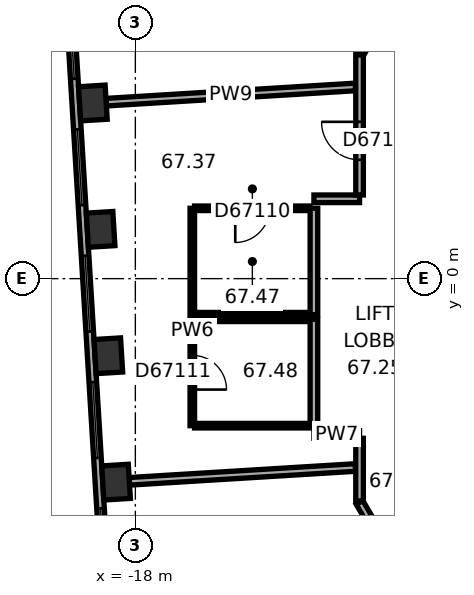
"""IFC4 building model, lengths in metres.
Left out: names, types, materials, properties, quantities, classifications, styles, units other than length and angle.
Written with IfcOpenShell. Run it as: python <this file> out.ifc"""

import sys

from ifc_helpers import new_model, si_unit, direction, frame, frame_2d, origin, origin_2d, place, context, subcontext, project, spatial, rectangle, extrude, element, fill, save


model = new_model("IFC4")
c1 = context("Model", 3, precision=1e-05, world=origin(), true_north=direction((0.0, 1.0)))
c2 = subcontext(c1, "Body", "Model", "MODEL_VIEW")
j1 = project(units=[si_unit("LENGTHUNIT", "METRE"), si_unit("PLANEANGLEUNIT", "RADIAN")], contexts=[c1])
p1 = place(None, origin())
s1 = spatial("IfcSite", under=j1, at=p1, CompositionType="ELEMENT")
p2 = place(p1, origin())
s2 = spatial("IfcBuilding", under=s1, at=p2, CompositionType="ELEMENT")
p3 = place(p2, frame((0.0, 0.0, 270.9)))
s3 = spatial("IfcBuildingStorey", under=s2, at=p3, CompositionType="ELEMENT", Elevation=270.9)
for number, where, z_axis, x_axis in (
    (1, (-19.118, 4.621, 0.0), (0.0, 0.0, 1.0), (0.061, -0.998, 0.0)),
    (2, (-18.914, 1.296, 0.0), (0.0, 0.0, 1.0), (0.061, -0.998, 0.0)),
    (3, (-18.711, -2.03, 0.0), (0.0, 0.0, 1.0), (0.061, -0.998, 0.0)),
    (4, (-18.508, -5.355, 0.0), (0.0, 0.0, 1.0), (0.061, -0.998, 0.0)),
):
    element("IfcColumn", number, at=place(p3, frame(where, z_axis=z_axis, x_axis=x_axis)), inside=s3, PredefinedType="COLUMN", context=c2, shape_type="SweptSolid", body=[
        extrude(rectangle(XDim=0.9, YDim=0.7, at=origin_2d()), origin(), (0.0, 0.0, 1.0), 3.7),
    ])
p4 = place(p3, frame((-19.803, 8.454, 0.0), z_axis=(0.0, 0.0, 1.0), x_axis=(0.061036717565, -0.998135521414, 0.0)))
e5 = element("IfcWall", 5, at=p4, inside=s3, PredefinedType="STANDARD", context=c2, shape_type="SweptSolid", body=[
    extrude(rectangle(XDim=17.731, YDim=0.2, at=frame_2d((8.866, 0.0))), origin(), (0.0, 0.0, 1.0), 3.7),
])
p5 = place(p4, frame((1.202, 0.0, 0.9)))
e6 = element("IfcOpeningElement", 6, at=p5, cuts=e5, PredefinedType="OPENING", context=c2, shape_type="SweptSolid", body=[
    extrude(rectangle(XDim=2.0, YDim=2.0, at=frame_2d((1.0, 1.0))), frame((0.0, 0.11, 0.0), z_axis=(0.0, -1.0, 0.0), x_axis=(1.0, 0.0, 0.0)), (0.0, 0.0, 1.0), 0.22),
])
p6 = place(p4, frame((4.533, 0.0, 0.9)))
e7 = element("IfcOpeningElement", 7, at=p6, cuts=e5, PredefinedType="OPENING", context=c2, shape_type="SweptSolid", body=[
    extrude(rectangle(XDim=2.0, YDim=2.0, at=frame_2d((1.0, 1.0))), frame((0.0, 0.11, 0.0), z_axis=(0.0, -1.0, 0.0), x_axis=(1.0, 0.0, 0.0)), (0.0, 0.0, 1.0), 0.22),
])
p7 = place(p4, frame((7.865, 0.0, 0.9)))
e8 = element("IfcOpeningElement", 8, at=p7, cuts=e5, PredefinedType="OPENING", context=c2, shape_type="SweptSolid", body=[
    extrude(rectangle(XDim=2.0, YDim=2.0, at=frame_2d((1.0, 1.0))), frame((0.0, 0.11, 0.0), z_axis=(0.0, -1.0, 0.0), x_axis=(1.0, 0.0, 0.0)), (0.0, 0.0, 1.0), 0.22),
])
p8 = place(p4, frame((11.197, 0.0, 0.9)))
e9 = element("IfcOpeningElement", 9, at=p8, cuts=e5, PredefinedType="OPENING", context=c2, shape_type="SweptSolid", body=[
    extrude(rectangle(XDim=2.0, YDim=2.0, at=frame_2d((1.0, 1.0))), frame((0.0, 0.11, 0.0), z_axis=(0.0, -1.0, 0.0), x_axis=(1.0, 0.0, 0.0)), (0.0, 0.0, 1.0), 0.22),
])
p9 = place(p4, frame((14.528, 0.0, 0.9)))
e10 = element("IfcOpeningElement", 10, at=p9, cuts=e5, PredefinedType="OPENING", context=c2, shape_type="SweptSolid", body=[
    extrude(rectangle(XDim=2.0, YDim=2.0, at=frame_2d((1.0, 1.0))), frame((0.0, 0.11, 0.0), z_axis=(0.0, -1.0, 0.0), x_axis=(1.0, 0.0, 0.0)), (0.0, 0.0, 1.0), 0.22),
])
p10 = place(p3, frame((-18.768, 4.643, 0.0), z_axis=(0.0, 0.0, 1.0), x_axis=(0.99813496285, 0.0610458511, 0.0)))
e11 = element("IfcWall", 11, at=p10, inside=s3, PredefinedType="PARTITIONING", context=c2, shape_type="SweptSolid", body=[
    extrude(rectangle(XDim=6.571, YDim=0.2, at=frame_2d((3.285, 0.0))), origin(), (0.0, 0.0, 1.0), 3.42),
])
p11 = place(p3, frame((-18.158, -5.333, 0.0), z_axis=(0.0, 0.0, 1.0), x_axis=(0.998135365626, 0.061039265125, 0.0)))
e12 = element("IfcWall", 12, at=p11, inside=s3, PredefinedType="PARTITIONING", context=c2, shape_type="SweptSolid", body=[
    extrude(rectangle(XDim=5.96, YDim=0.2, at=frame_2d((2.98, 0.0))), origin(), (0.0, 0.0, 1.0), 2.87),
])
p12 = place(p3, frame((-16.501, -3.869, 0.0), z_axis=(0.0, 0.0, 1.0), x_axis=(0.0, 1.0, 0.0)))
e13 = element("IfcWall", 13, at=p12, inside=s3, PredefinedType="PARTITIONING", context=c2, shape_type="SweptSolid", body=[
    extrude(rectangle(XDim=2.8, YDim=0.12, at=frame_2d((1.4, 0.0))), origin(), (0.0, 0.0, 1.0), 3.42),
])
p13 = place(p12, frame((0.95, 0.0, 0.0)))
e14 = element("IfcOpeningElement", 14, at=p13, cuts=e13, PredefinedType="OPENING", context=c2, shape_type="SweptSolid", body=[
    extrude(rectangle(XDim=0.9, YDim=2.1, at=frame_2d((0.45, 1.05))), frame((0.0, 0.07, 0.0), z_axis=(0.0, -1.0, 0.0), x_axis=(1.0, 0.0, 0.0)), (0.0, 0.0, 1.0), 0.14),
])
p14 = place(p3, frame((-16.501, -0.949, 0.0), z_axis=(0.0, 0.0, 1.0), x_axis=(0.0, 1.0, 0.0)))
e15 = element("IfcWall", 15, at=p14, inside=s3, PredefinedType="PARTITIONING", context=c2, shape_type="SweptSolid", body=[
    extrude(rectangle(XDim=2.8, YDim=0.12, at=frame_2d((1.4, 0.0))), origin(), (0.0, 0.0, 1.0), 3.42),
])
p15 = place(p3, frame((-16.441, -1.069, 0.0), z_axis=(0.0, 0.0, 1.0), x_axis=(1.0, 0.0, 0.0)))
e16 = element("IfcWall", 16, at=p15, inside=s3, PredefinedType="PARTITIONING", context=c2, shape_type="SweptSolid", body=[
    extrude(rectangle(XDim=3.04, YDim=0.12, at=frame_2d((1.52, 0.0))), origin(), (0.0, 0.0, 1.0), 3.42),
])
p16 = place(p3, frame((-16.441, 1.851, 0.0), z_axis=(0.0, 0.0, 1.0), x_axis=(1.0, 0.0, 0.0)))
e17 = element("IfcWall", 17, at=p16, inside=s3, PredefinedType="PARTITIONING", context=c2, shape_type="SweptSolid", body=[
    extrude(rectangle(XDim=3.04, YDim=0.12, at=frame_2d((1.52, 0.0))), origin(), (0.0, 0.0, 1.0), 3.42),
])
p17 = place(p16, frame((1.07, 0.0, 0.0)))
e18 = element("IfcOpeningElement", 18, at=p17, cuts=e17, PredefinedType="OPENING", context=c2, shape_type="SweptSolid", body=[
    extrude(rectangle(XDim=0.9, YDim=2.1, at=frame_2d((0.45, 1.05))), frame((0.0, 0.07, 0.0), z_axis=(0.0, -1.0, 0.0), x_axis=(1.0, 0.0, 0.0)), (0.0, 0.0, 1.0), 0.14),
])
for number, where, z_axis, x_axis in (
    (19, (-13.401, -3.869, 0.0), (0.0, 0.0, 1.0), (-1.0, 0.0, 0.0)),
    (20, (-13.401, -0.949, 0.0), (0.0, 0.0, 1.0), (-1.0, 0.0, 0.0)),
):
    element("IfcWall", number, at=place(p3, frame(where, z_axis=z_axis, x_axis=x_axis)), inside=s3, PredefinedType="PARTITIONING", context=c2, shape_type="SweptSolid", body=[
        extrude(rectangle(XDim=3.04, YDim=0.12, at=frame_2d((1.52, 0.0))), origin(), (0.0, 0.0, 1.0), 3.42),
    ])
p18 = place(p3, frame((-13.301, -4.101, 0.0), z_axis=(0.0, 0.0, 1.0), x_axis=(1.0, 0.0, 0.0)))
e21 = element("IfcWall", 21, at=p18, inside=s3, PredefinedType="PARTITIONING", context=c2, shape_type="SweptSolid", body=[
    extrude(rectangle(XDim=1.201, YDim=0.2, at=frame_2d((0.601, 0.0))), origin(), (0.0, 0.0, 1.0), 3.42),
])
p19 = place(p3, frame((-13.301, -1.069, 0.0), z_axis=(0.0, 0.0, 1.0), x_axis=(0.0, -1.0, 0.0)))
e22 = element("IfcWall", 22, at=p19, inside=s3, PredefinedType="PARTITIONING", context=c2, shape_type="SweptSolid", body=[
    extrude(rectangle(XDim=2.8, YDim=0.2, at=frame_2d((1.4, 0.0))), origin(), (0.0, 0.0, 1.0), 3.42),
])
p20 = place(p3, frame((-13.301, 1.851, 0.0), z_axis=(0.0, 0.0, 1.0), x_axis=(0.0, -1.0, 0.0)))
e23 = element("IfcWall", 23, at=p20, inside=s3, PredefinedType="PARTITIONING", context=c2, shape_type="SweptSolid", body=[
    extrude(rectangle(XDim=2.8, YDim=0.2, at=frame_2d((1.4, 0.0))), origin(), (0.0, 0.0, 1.0), 3.42),
])
p21 = place(p3, frame((-12.1, -5.889, 0.0), z_axis=(0.0, 0.0, 1.0), x_axis=(0.500063520245, -0.865988727248, 0.0)))
e24 = element("IfcWall", 24, at=p21, inside=s3, PredefinedType="PARTITIONING", context=c2, shape_type="SweptSolid", body=[
    extrude(rectangle(XDim=1.9, YDim=0.2, at=frame_2d((0.95, 0.0))), origin(), (0.0, 0.0, 1.0), 3.42),
])
p22 = place(p3, frame((-12.1, -4.201, 0.0), z_axis=(0.0, 0.0, 1.0), x_axis=(0.0, -1.0, 0.0)))
e25 = element("IfcWall", 25, at=p22, inside=s3, PredefinedType="PARTITIONING", context=c2, shape_type="SweptSolid", body=[
    extrude(rectangle(XDim=1.648, YDim=0.2, at=frame_2d((0.824, 0.0))), origin(), (0.0, 0.0, 1.0), 3.42),
])
p23 = place(p3, frame((-12.1, 2.101, 0.0), z_axis=(0.0, 0.0, 1.0), x_axis=(-1.0, 0.0, 0.0)))
e26 = element("IfcWall", 26, at=p23, inside=s3, PredefinedType="PARTITIONING", context=c2, shape_type="SweptSolid", body=[
    extrude(rectangle(XDim=1.201, YDim=0.2, at=frame_2d((0.601, 0.0))), origin(), (0.0, 0.0, 1.0), 3.42),
])
p24 = place(p3, frame((-12.1, 5.889, 0.0), z_axis=(0.0, 0.0, 1.0), x_axis=(0.0, -1.0, 0.0)))
e27 = element("IfcWall", 27, at=p24, inside=s3, PredefinedType="PARTITIONING", context=c2, shape_type="SweptSolid", body=[
    extrude(rectangle(XDim=3.688, YDim=0.2, at=frame_2d((1.844, 0.0))), origin(), (0.0, 0.0, 1.0), 3.42),
])
p25 = place(p24, frame((1.763, 0.0, 0.0)))
e28 = element("IfcOpeningElement", 28, at=p25, cuts=e27, PredefinedType="OPENING", context=c2, shape_type="SweptSolid", body=[
    extrude(rectangle(XDim=1.0, YDim=2.1, at=frame_2d((0.5, 1.05))), frame((0.0, 0.11, 0.0), z_axis=(0.0, -1.0, 0.0), x_axis=(1.0, 0.0, 0.0)), (0.0, 0.0, 1.0), 0.22),
])
p26 = place(p3, frame((-11.15, 7.534, 0.0), z_axis=(0.0, 0.0, 1.0), x_axis=(-0.500063286585, -0.865988862174, 0.0)))
e29 = element("IfcWall", 29, at=p26, inside=s3, PredefinedType="PARTITIONING", context=c2, shape_type="SweptSolid", body=[
    extrude(rectangle(XDim=1.86, YDim=0.2, at=frame_2d((0.93, 0.0))), origin(), (0.0, 0.0, 1.0), 3.42),
])
p27 = place(p5, origin())
e30 = element("IfcWindow", 30, at=p27, inside=s3, PartitioningType="SINGLE_PANEL", PredefinedType="WINDOW", context=c2, shape_type="SweptSolid", body=[
    extrude(rectangle(XDim=2.0, YDim=2.0, at=frame_2d((1.0, 1.0))), frame((0.0, 0.03, 0.0), z_axis=(0.0, -1.0, 0.0), x_axis=(1.0, 0.0, 0.0)), (0.0, 0.0, 1.0), 0.06),
])
fill(e6, e30)
p28 = place(p6, origin())
e31 = element("IfcWindow", 31, at=p28, inside=s3, PartitioningType="SINGLE_PANEL", PredefinedType="WINDOW", context=c2, shape_type="SweptSolid", body=[
    extrude(rectangle(XDim=2.0, YDim=2.0, at=frame_2d((1.0, 1.0))), frame((0.0, 0.03, 0.0), z_axis=(0.0, -1.0, 0.0), x_axis=(1.0, 0.0, 0.0)), (0.0, 0.0, 1.0), 0.06),
])
fill(e7, e31)
p29 = place(p7, origin())
e32 = element("IfcWindow", 32, at=p29, inside=s3, PartitioningType="SINGLE_PANEL", PredefinedType="WINDOW", context=c2, shape_type="SweptSolid", body=[
    extrude(rectangle(XDim=2.0, YDim=2.0, at=frame_2d((1.0, 1.0))), frame((0.0, 0.03, 0.0), z_axis=(0.0, -1.0, 0.0), x_axis=(1.0, 0.0, 0.0)), (0.0, 0.0, 1.0), 0.06),
])
fill(e8, e32)
p30 = place(p8, origin())
e33 = element("IfcWindow", 33, at=p30, inside=s3, PartitioningType="SINGLE_PANEL", PredefinedType="WINDOW", context=c2, shape_type="SweptSolid", body=[
    extrude(rectangle(XDim=2.0, YDim=2.0, at=frame_2d((1.0, 1.0))), frame((0.0, 0.03, 0.0), z_axis=(0.0, -1.0, 0.0), x_axis=(1.0, 0.0, 0.0)), (0.0, 0.0, 1.0), 0.06),
])
fill(e9, e33)
p31 = place(p9, origin())
e34 = element("IfcWindow", 34, at=p31, inside=s3, PartitioningType="SINGLE_PANEL", PredefinedType="WINDOW", context=c2, shape_type="SweptSolid", body=[
    extrude(rectangle(XDim=2.0, YDim=2.0, at=frame_2d((1.0, 1.0))), frame((0.0, 0.03, 0.0), z_axis=(0.0, -1.0, 0.0), x_axis=(1.0, 0.0, 0.0)), (0.0, 0.0, 1.0), 0.06),
])
fill(e10, e34)
p32 = place(p25, origin())
e35 = element("IfcDoor", 35, at=p32, inside=s3, OperationType="SINGLE_SWING_LEFT", PredefinedType="DOOR", context=c2, shape_type="SweptSolid", body=[
    extrude(rectangle(XDim=1.0, YDim=2.1, at=frame_2d((0.5, 1.05))), frame((0.0, 0.025, 0.0), z_axis=(0.0, -1.0, 0.0), x_axis=(1.0, 0.0, 0.0)), (0.0, 0.0, 1.0), 0.05),
])
fill(e28, e35)
p33 = place(p17, origin())
e36 = element("IfcDoor", 36, at=p33, inside=s3, OperationType="SINGLE_SWING_LEFT", PredefinedType="DOOR", context=c2, shape_type="SweptSolid", body=[
    extrude(rectangle(XDim=0.9, YDim=2.1, at=frame_2d((0.45, 1.05))), frame((0.0, 0.025, 0.0), z_axis=(0.0, -1.0, 0.0), x_axis=(1.0, 0.0, 0.0)), (0.0, 0.0, 1.0), 0.05),
])
fill(e18, e36)
p34 = place(p13, origin())
e37 = element("IfcDoor", 37, at=p34, inside=s3, OperationType="SINGLE_SWING_LEFT", PredefinedType="DOOR", context=c2, shape_type="SweptSolid", body=[
    extrude(rectangle(XDim=0.9, YDim=2.1, at=frame_2d((0.45, 1.05))), frame((0.0, 0.025, 0.0), z_axis=(0.0, -1.0, 0.0), x_axis=(1.0, 0.0, 0.0)), (0.0, 0.0, 1.0), 0.05),
])
fill(e14, e37)
save(model, sys.argv[1])
